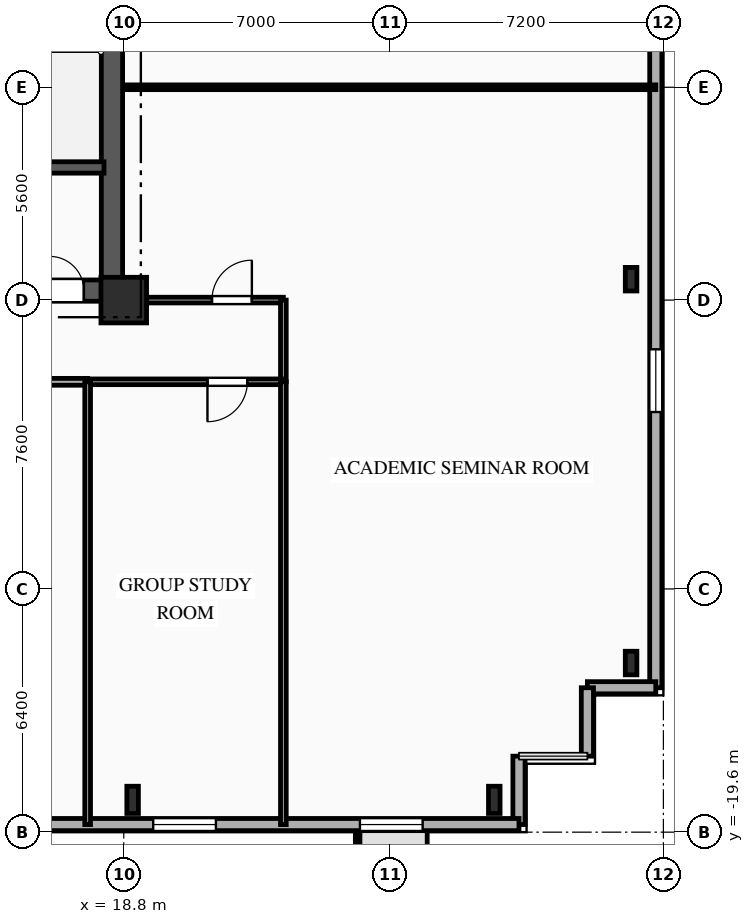
"""IFC4 building model, lengths in metres.
Left out: names, types, materials, properties, quantities, classifications, styles, units other than length and angle.
Written with IfcOpenShell. Run it as: python <this file> out.ifc"""

import sys

from ifc_helpers import new_model, si_unit, direction, frame, frame_2d, origin, origin_2d, place, context, subcontext, project, spatial, rectangle, i_section, extrude, element, fill, save


model = new_model("IFC4")
c1 = context("Model", 3, precision=1e-05, world=origin(), true_north=direction((0.0, 1.0)))
c2 = subcontext(c1, "Body", "Model", "MODEL_VIEW")
j1 = project(units=[si_unit("LENGTHUNIT", "METRE"), si_unit("PLANEANGLEUNIT", "RADIAN")], contexts=[c1])
p1 = place(None, origin())
s1 = spatial("IfcSite", under=j1, at=p1, CompositionType="ELEMENT")
p2 = place(p1, origin())
s2 = spatial("IfcBuilding", under=s1, at=p2, CompositionType="ELEMENT")
p3 = place(p2, frame((0.0, 0.0, 63.85)))
s3 = spatial("IfcBuildingStorey", under=s2, at=p3, CompositionType="ELEMENT", Elevation=63.85)
p4 = place(p3, frame((18.8, -5.6, 0.0), z_axis=(0.0, 0.0, 1.0), x_axis=(1.0, 0.0, 0.0)))
e1 = element("IfcColumn", 1, at=p4, inside=s3, PredefinedType="COLUMN", context=c2, shape_type="SweptSolid", body=[
    extrude(rectangle(XDim=1.2, YDim=1.2, at=origin_2d()), origin(), (0.0, 0.0, 1.0), 3.35),
])
for number, where, z_axis, x_axis in (
    (2, (19.033, -18.75, 0.0), (0.0, 0.0, 1.0), (1.0, 0.0, 0.0)),
    (3, (28.55, -18.75, 0.0), (0.0, 0.0, 1.0), (1.0, 0.0, 0.0)),
):
    element("IfcColumn", number, at=place(p3, frame(where, z_axis=z_axis, x_axis=x_axis)), inside=s3, PredefinedType="COLUMN", context=c2, shape_type="SweptSolid", body=[
        extrude(i_section(OverallWidth=0.304, OverallDepth=0.716, WebThickness=0.021, FlangeThickness=0.04, FilletRadius=0.027, at=origin_2d()), origin(), (0.0, 0.0, 1.0), 3.35),
    ])
for number, where, z_axis, x_axis in (
    (4, (32.15, -15.15, 0.0), (0.0, 0.0, 1.0), (1.0, 0.0, 0.0)),
    (5, (32.15, -5.05, 0.0), (0.0, 0.0, 1.0), (1.0, 0.0, 0.0)),
):
    element("IfcColumn", number, at=place(p3, frame(where, z_axis=z_axis, x_axis=x_axis)), inside=s3, PredefinedType="COLUMN", context=c2, shape_type="SweptSolid", body=[
        extrude(i_section(OverallWidth=0.305, OverallDepth=0.62, WebThickness=0.021, FlangeThickness=0.04, FilletRadius=0.027, at=origin_2d()), origin(), (0.0, 0.0, 1.0), 3.35),
    ])
p5 = place(p3, frame((32.8, 15.8, 0.0), z_axis=(0.0, 0.0, 1.0), x_axis=(0.0, -1.0, 0.0)))
e6 = element("IfcWall", 6, at=p5, inside=s3, PredefinedType="SOLIDWALL", context=c2, shape_type="SweptSolid", body=[
    extrude(rectangle(XDim=31.6, YDim=0.32, at=frame_2d((15.8, 0.0))), origin(), (0.0, 0.0, 1.0), 3.035),
])
p6 = place(p5, frame((7.36, 0.0, 0.85)))
e7 = element("IfcOpeningElement", 7, at=p6, cuts=e6, PredefinedType="OPENING", context=c2, shape_type="SweptSolid", body=[
    extrude(rectangle(XDim=1.6, YDim=1.85, at=frame_2d((0.8, 0.925))), frame((0.0, 0.17, 0.0), z_axis=(0.0, -1.0, 0.0), x_axis=(1.0, 0.0, 0.0)), (0.0, 0.0, 1.0), 0.34),
])
p7 = place(p5, frame((22.695, 0.0, 0.85)))
e8 = element("IfcOpeningElement", 8, at=p7, cuts=e6, PredefinedType="OPENING", context=c2, shape_type="SweptSolid", body=[
    extrude(rectangle(XDim=1.65, YDim=1.85, at=frame_2d((0.825, 0.925))), frame((0.0, 0.17, 0.0), z_axis=(0.0, -1.0, 0.0), x_axis=(1.0, 0.0, 0.0)), (0.0, 0.0, 1.0), 0.34),
])
for number, where, z_axis, x_axis in (
    (9, (32.8, -15.8, 0.0), (0.0, 0.0, 1.0), (-1.0, 0.0, 0.0)),
    (10, (31.0, -15.8, 0.0), (0.0, 0.0, 1.0), (0.0, -1.0, 0.0)),
):
    element("IfcWall", number, at=place(p3, frame(where, z_axis=z_axis, x_axis=x_axis)), inside=s3, PredefinedType="SOLIDWALL", context=c2, shape_type="SweptSolid", body=[
        extrude(rectangle(XDim=1.8, YDim=0.32, at=frame_2d((0.9, 0.0))), origin(), (0.0, 0.0, 1.0), 3.035),
    ])
p8 = place(p3, frame((29.2, -17.6, 0.0), z_axis=(0.0, 0.0, 1.0), x_axis=(0.0, -1.0, 0.0)))
e11 = element("IfcWall", 11, at=p8, inside=s3, PredefinedType="SOLIDWALL", context=c2, shape_type="SweptSolid", body=[
    extrude(rectangle(XDim=1.8, YDim=0.32, at=frame_2d((0.9, 0.0))), origin(), (0.0, 0.0, 1.0), 3.035),
])
p9 = place(p3, frame((29.2, -19.4, 0.0), z_axis=(0.0, 0.0, 1.0), x_axis=(-1.0, 0.0, 0.0)))
e12 = element("IfcWall", 12, at=p9, inside=s3, PredefinedType="SOLIDWALL", context=c2, shape_type="SweptSolid", body=[
    extrude(rectangle(XDim=58.4, YDim=0.32, at=frame_2d((29.2, 0.0))), origin(), (0.0, 0.0, 1.0), 3.035),
])
p10 = place(p9, frame((2.535, 0.0, 0.85)))
e13 = element("IfcOpeningElement", 13, at=p10, cuts=e12, PredefinedType="OPENING", context=c2, shape_type="SweptSolid", body=[
    extrude(rectangle(XDim=1.65, YDim=1.85, at=frame_2d((0.825, 0.925))), frame((0.0, 0.17, 0.0), z_axis=(0.0, -1.0, 0.0), x_axis=(1.0, 0.0, 0.0)), (0.0, 0.0, 1.0), 0.34),
])
p11 = place(p9, frame((7.975, 0.0, 0.85)))
e14 = element("IfcOpeningElement", 14, at=p11, cuts=e12, PredefinedType="OPENING", context=c2, shape_type="SweptSolid", body=[
    extrude(rectangle(XDim=1.65, YDim=1.85, at=frame_2d((0.825, 0.925))), frame((0.0, 0.17, 0.0), z_axis=(0.0, -1.0, 0.0), x_axis=(1.0, 0.0, 0.0)), (0.0, 0.0, 1.0), 0.34),
])
p12 = place(p9, frame((13.14, 0.0, 0.85)))
e15 = element("IfcOpeningElement", 15, at=p12, cuts=e12, PredefinedType="OPENING", context=c2, shape_type="SweptSolid", body=[
    extrude(rectangle(XDim=2.2, YDim=1.85, at=frame_2d((1.1, 0.925))), frame((0.0, 0.17, 0.0), z_axis=(0.0, -1.0, 0.0), x_axis=(1.0, 0.0, 0.0)), (0.0, 0.0, 1.0), 0.34),
])
p13 = place(p9, frame((19.992, 0.0, 0.85)))
e16 = element("IfcOpeningElement", 16, at=p13, cuts=e12, PredefinedType="OPENING", context=c2, shape_type="SweptSolid", body=[
    extrude(rectangle(XDim=2.2, YDim=1.85, at=frame_2d((1.1, 0.925))), frame((0.0, 0.17, 0.0), z_axis=(0.0, -1.0, 0.0), x_axis=(1.0, 0.0, 0.0)), (0.0, 0.0, 1.0), 0.34),
])
p14 = place(p9, frame((24.66, 0.0, 0.85)))
e17 = element("IfcOpeningElement", 17, at=p14, cuts=e12, PredefinedType="OPENING", context=c2, shape_type="SweptSolid", body=[
    extrude(rectangle(XDim=2.2, YDim=1.85, at=frame_2d((1.1, 0.925))), frame((0.0, 0.17, 0.0), z_axis=(0.0, -1.0, 0.0), x_axis=(1.0, 0.0, 0.0)), (0.0, 0.0, 1.0), 0.34),
])
p15 = place(p9, frame((30.42, 0.0, 0.85)))
e18 = element("IfcOpeningElement", 18, at=p15, cuts=e12, PredefinedType="OPENING", context=c2, shape_type="SweptSolid", body=[
    extrude(rectangle(XDim=2.2, YDim=1.85, at=frame_2d((1.1, 0.925))), frame((0.0, 0.17, 0.0), z_axis=(0.0, -1.0, 0.0), x_axis=(1.0, 0.0, 0.0)), (0.0, 0.0, 1.0), 0.34),
])
p16 = place(p9, frame((36.18, 0.0, 0.85)))
e19 = element("IfcOpeningElement", 19, at=p16, cuts=e12, PredefinedType="OPENING", context=c2, shape_type="SweptSolid", body=[
    extrude(rectangle(XDim=2.2, YDim=1.85, at=frame_2d((1.1, 0.925))), frame((0.0, 0.17, 0.0), z_axis=(0.0, -1.0, 0.0), x_axis=(1.0, 0.0, 0.0)), (0.0, 0.0, 1.0), 0.34),
])
p17 = place(p9, frame((41.94, 0.0, 0.85)))
e20 = element("IfcOpeningElement", 20, at=p17, cuts=e12, PredefinedType="OPENING", context=c2, shape_type="SweptSolid", body=[
    extrude(rectangle(XDim=2.2, YDim=1.85, at=frame_2d((1.1, 0.925))), frame((0.0, 0.17, 0.0), z_axis=(0.0, -1.0, 0.0), x_axis=(1.0, 0.0, 0.0)), (0.0, 0.0, 1.0), 0.34),
])
p18 = place(p9, frame((48.821, 0.0, 0.85)))
e21 = element("IfcOpeningElement", 21, at=p18, cuts=e12, PredefinedType="OPENING", context=c2, shape_type="SweptSolid", body=[
    extrude(rectangle(XDim=1.65, YDim=1.85, at=frame_2d((0.825, 0.925))), frame((0.0, 0.17, 0.0), z_axis=(0.0, -1.0, 0.0), x_axis=(1.0, 0.0, 0.0)), (0.0, 0.0, 1.0), 0.34),
])
p19 = place(p9, frame((53.775, 0.0, 0.85)))
e22 = element("IfcOpeningElement", 22, at=p19, cuts=e12, PredefinedType="OPENING", context=c2, shape_type="SweptSolid", body=[
    extrude(rectangle(XDim=1.65, YDim=1.85, at=frame_2d((0.825, 0.925))), frame((0.0, 0.17, 0.0), z_axis=(0.0, -1.0, 0.0), x_axis=(1.0, 0.0, 0.0)), (0.0, 0.0, 1.0), 0.34),
])
p20 = place(p3, frame((9.2, -5.35, 0.0), z_axis=(0.0, 0.0, 1.0), x_axis=(1.0, 0.0, 0.0)))
e23 = element("IfcWall", 23, at=p20, inside=s3, PredefinedType="SHEAR", context=c2, shape_type="SweptSolid", body=[
    extrude(rectangle(XDim=9.6, YDim=0.56, at=frame_2d((4.8, 0.0))), origin(), (0.0, 0.0, 1.0), 3.035),
])
p21 = place(p20, frame((7.65, 0.0, 0.0)))
e24 = element("IfcOpeningElement", 24, at=p21, cuts=e23, PredefinedType="OPENING", context=c2, shape_type="SweptSolid", body=[
    extrude(rectangle(XDim=0.9, YDim=2.1, at=frame_2d((0.45, 1.05))), frame((0.0, 0.29, 0.0), z_axis=(0.0, -1.0, 0.0), x_axis=(1.0, 0.0, 0.0)), (0.0, 0.0, 1.0), 0.58),
])
p22 = place(p3, frame((18.49, -5.05, 0.0), z_axis=(0.0, 0.0, 1.0), x_axis=(0.0, 1.0, 0.0)))
e25 = element("IfcWall", 25, at=p22, inside=s3, PredefinedType="SHEAR", context=c2, shape_type="SweptSolid", body=[
    extrude(rectangle(XDim=10.1, YDim=0.56, at=frame_2d((5.05, 0.0))), origin(), (0.0, 0.0, 1.0), 3.035),
])
p23 = place(p3, frame((15.1, -2.11, 0.0), z_axis=(0.0, 0.0, 1.0), x_axis=(1.0, 0.0, 0.0)))
e26 = element("IfcWall", 26, at=p23, inside=s3, PredefinedType="SHEAR", context=c2, shape_type="SweptSolid", body=[
    extrude(rectangle(XDim=3.18, YDim=0.3, at=frame_2d((1.59, 0.0))), origin(), (0.0, 0.0, 1.0), 3.035),
])
p24 = place(p3, frame((18.8, -5.6, 0.0), z_axis=(0.0, 0.0, 1.0), x_axis=(1.0, 0.0, 0.0)))
e27 = element("IfcWall", 27, at=p24, inside=s3, PredefinedType="PARTITIONING", context=c2, shape_type="SweptSolid", body=[
    extrude(rectangle(XDim=4.2, YDim=0.15, at=frame_2d((2.1, 0.0))), origin(), (0.0, 0.0, 1.0), 3.035),
])
p25 = place(p24, frame((2.321, 0.0, 0.0)))
e28 = element("IfcOpeningElement", 28, at=p25, cuts=e27, PredefinedType="OPENING", context=c2, shape_type="SweptSolid", body=[
    extrude(rectangle(XDim=1.05, YDim=2.15, at=frame_2d((0.525, 1.075))), frame((0.0, 0.085, 0.0), z_axis=(0.0, -1.0, 0.0), x_axis=(1.0, 0.0, 0.0)), (0.0, 0.0, 1.0), 0.17),
])
p26 = place(p3, frame((23.0, -5.6, 0.0), z_axis=(0.0, 0.0, 1.0), x_axis=(0.0, -1.0, 0.0)))
e29 = element("IfcWall", 29, at=p26, inside=s3, PredefinedType="PARTITIONING", context=c2, shape_type="SweptSolid", body=[
    extrude(rectangle(XDim=2.15, YDim=0.15, at=frame_2d((1.075, 0.0))), origin(), (0.0, 0.0, 1.0), 3.035),
])
p27 = place(p3, frame((17.85, -7.75, 0.0), z_axis=(0.0, 0.0, 1.0), x_axis=(-1.0, 0.0, 0.0)))
e30 = element("IfcWall", 30, at=p27, inside=s3, PredefinedType="PARTITIONING", context=c2, shape_type="SweptSolid", body=[
    extrude(rectangle(XDim=3.3, YDim=0.18, at=frame_2d((1.65, 0.0))), origin(), (0.0, 0.0, 1.0), 3.035),
])
p28 = place(p27, frame((1.577, 0.0, 0.0)))
e31 = element("IfcOpeningElement", 31, at=p28, cuts=e30, PredefinedType="OPENING", context=c2, shape_type="SweptSolid", body=[
    extrude(rectangle(XDim=1.0, YDim=2.15, at=frame_2d((0.5, 1.075))), frame((0.0, 0.1, 0.0), z_axis=(0.0, -1.0, 0.0), x_axis=(1.0, 0.0, 0.0)), (0.0, 0.0, 1.0), 0.2),
])
p29 = place(p3, frame((23.0, -7.75, 0.0), z_axis=(0.0, 0.0, 1.0), x_axis=(-1.0, 0.0, 0.0)))
e32 = element("IfcWall", 32, at=p29, inside=s3, PredefinedType="PARTITIONING", context=c2, shape_type="SweptSolid", body=[
    extrude(rectangle(XDim=5.15, YDim=0.15, at=frame_2d((2.575, 0.0))), origin(), (0.0, 0.0, 1.0), 3.035),
])
p30 = place(p29, frame((0.948, 0.0, 0.0)))
e33 = element("IfcOpeningElement", 33, at=p30, cuts=e32, PredefinedType="OPENING", context=c2, shape_type="SweptSolid", body=[
    extrude(rectangle(XDim=1.05, YDim=2.15, at=frame_2d((0.525, 1.075))), frame((0.0, 0.085, 0.0), z_axis=(0.0, -1.0, 0.0), x_axis=(1.0, 0.0, 0.0)), (0.0, 0.0, 1.0), 0.17),
])
p31 = place(p3, frame((18.8, 0.0, 0.0), z_axis=(0.0, 0.0, 1.0), x_axis=(1.0, 0.0, 0.0)))
e34 = element("IfcWall", 34, at=p31, inside=s3, PredefinedType="PARTITIONING", context=c2, shape_type="SweptSolid", body=[
    extrude(rectangle(XDim=14.0, YDim=0.125, at=frame_2d((7.0, 0.0))), origin(), (0.0, 0.0, 1.0), 3.035),
])
for number, where, z_axis, x_axis in (
    (35, (23.0, -19.4, 0.0), (0.0, 0.0, 1.0), (0.0, 1.0, 0.0)),
    (36, (17.85, -7.75, 0.0), (0.0, 0.0, 1.0), (0.0, -1.0, 0.0)),
):
    element("IfcWall", number, at=place(p3, frame(where, z_axis=z_axis, x_axis=x_axis)), inside=s3, PredefinedType="PARTITIONING", context=c2, shape_type="SweptSolid", body=[
        extrude(rectangle(XDim=11.65, YDim=0.15, at=frame_2d((5.825, 0.0))), origin(), (0.0, 0.0, 1.0), 3.035),
    ])
p32 = place(p7, origin())
e37 = element("IfcWindow", 37, at=p32, inside=s3, PartitioningType="SINGLE_PANEL", PredefinedType="WINDOW", context=c2, shape_type="SweptSolid", body=[
    extrude(rectangle(XDim=1.65, YDim=1.85, at=frame_2d((0.825, 0.925))), frame((0.0, 0.03, 0.0), z_axis=(0.0, -1.0, 0.0), x_axis=(1.0, 0.0, 0.0)), (0.0, 0.0, 1.0), 0.06),
])
fill(e8, e37)
p33 = place(p10, origin())
e38 = element("IfcWindow", 38, at=p33, inside=s3, PartitioningType="SINGLE_PANEL", PredefinedType="WINDOW", context=c2, shape_type="SweptSolid", body=[
    extrude(rectangle(XDim=1.65, YDim=1.85, at=frame_2d((0.825, 0.925))), frame((0.0, 0.03, 0.0), z_axis=(0.0, -1.0, 0.0), x_axis=(1.0, 0.0, 0.0)), (0.0, 0.0, 1.0), 0.06),
])
fill(e13, e38)
p34 = place(p11, origin())
e39 = element("IfcWindow", 39, at=p34, inside=s3, PartitioningType="SINGLE_PANEL", PredefinedType="WINDOW", context=c2, shape_type="SweptSolid", body=[
    extrude(rectangle(XDim=1.65, YDim=1.85, at=frame_2d((0.825, 0.925))), frame((0.0, 0.03, 0.0), z_axis=(0.0, -1.0, 0.0), x_axis=(1.0, 0.0, 0.0)), (0.0, 0.0, 1.0), 0.06),
])
fill(e14, e39)
p35 = place(p21, origin())
e40 = element("IfcDoor", 40, at=p35, inside=s3, OperationType="SINGLE_SWING_LEFT", PredefinedType="DOOR", context=c2, shape_type="SweptSolid", body=[
    extrude(rectangle(XDim=0.9, YDim=2.1, at=frame_2d((0.45, 1.05))), frame((0.0, 0.025, 0.0), z_axis=(0.0, -1.0, 0.0), x_axis=(1.0, 0.0, 0.0)), (0.0, 0.0, 1.0), 0.05),
])
fill(e24, e40)
p36 = place(p25, origin())
e41 = element("IfcDoor", 41, at=p36, inside=s3, OperationType="SINGLE_SWING_RIGHT", PredefinedType="DOOR", context=c2, shape_type="SweptSolid", body=[
    extrude(rectangle(XDim=1.05, YDim=2.15, at=frame_2d((0.525, 1.075))), frame((0.0, 0.025, 0.0), z_axis=(0.0, -1.0, 0.0), x_axis=(1.0, 0.0, 0.0)), (0.0, 0.0, 1.0), 0.05),
])
fill(e28, e41)
p37 = place(p30, origin())
e42 = element("IfcDoor", 42, at=p37, inside=s3, OperationType="SINGLE_SWING_RIGHT", PredefinedType="DOOR", context=c2, shape_type="SweptSolid", body=[
    extrude(rectangle(XDim=1.05, YDim=2.15, at=frame_2d((0.525, 1.075))), frame((0.0, 0.025, 0.0), z_axis=(0.0, -1.0, 0.0), x_axis=(1.0, 0.0, 0.0)), (0.0, 0.0, 1.0), 0.05),
])
fill(e33, e42)
save(model, sys.argv[1])
